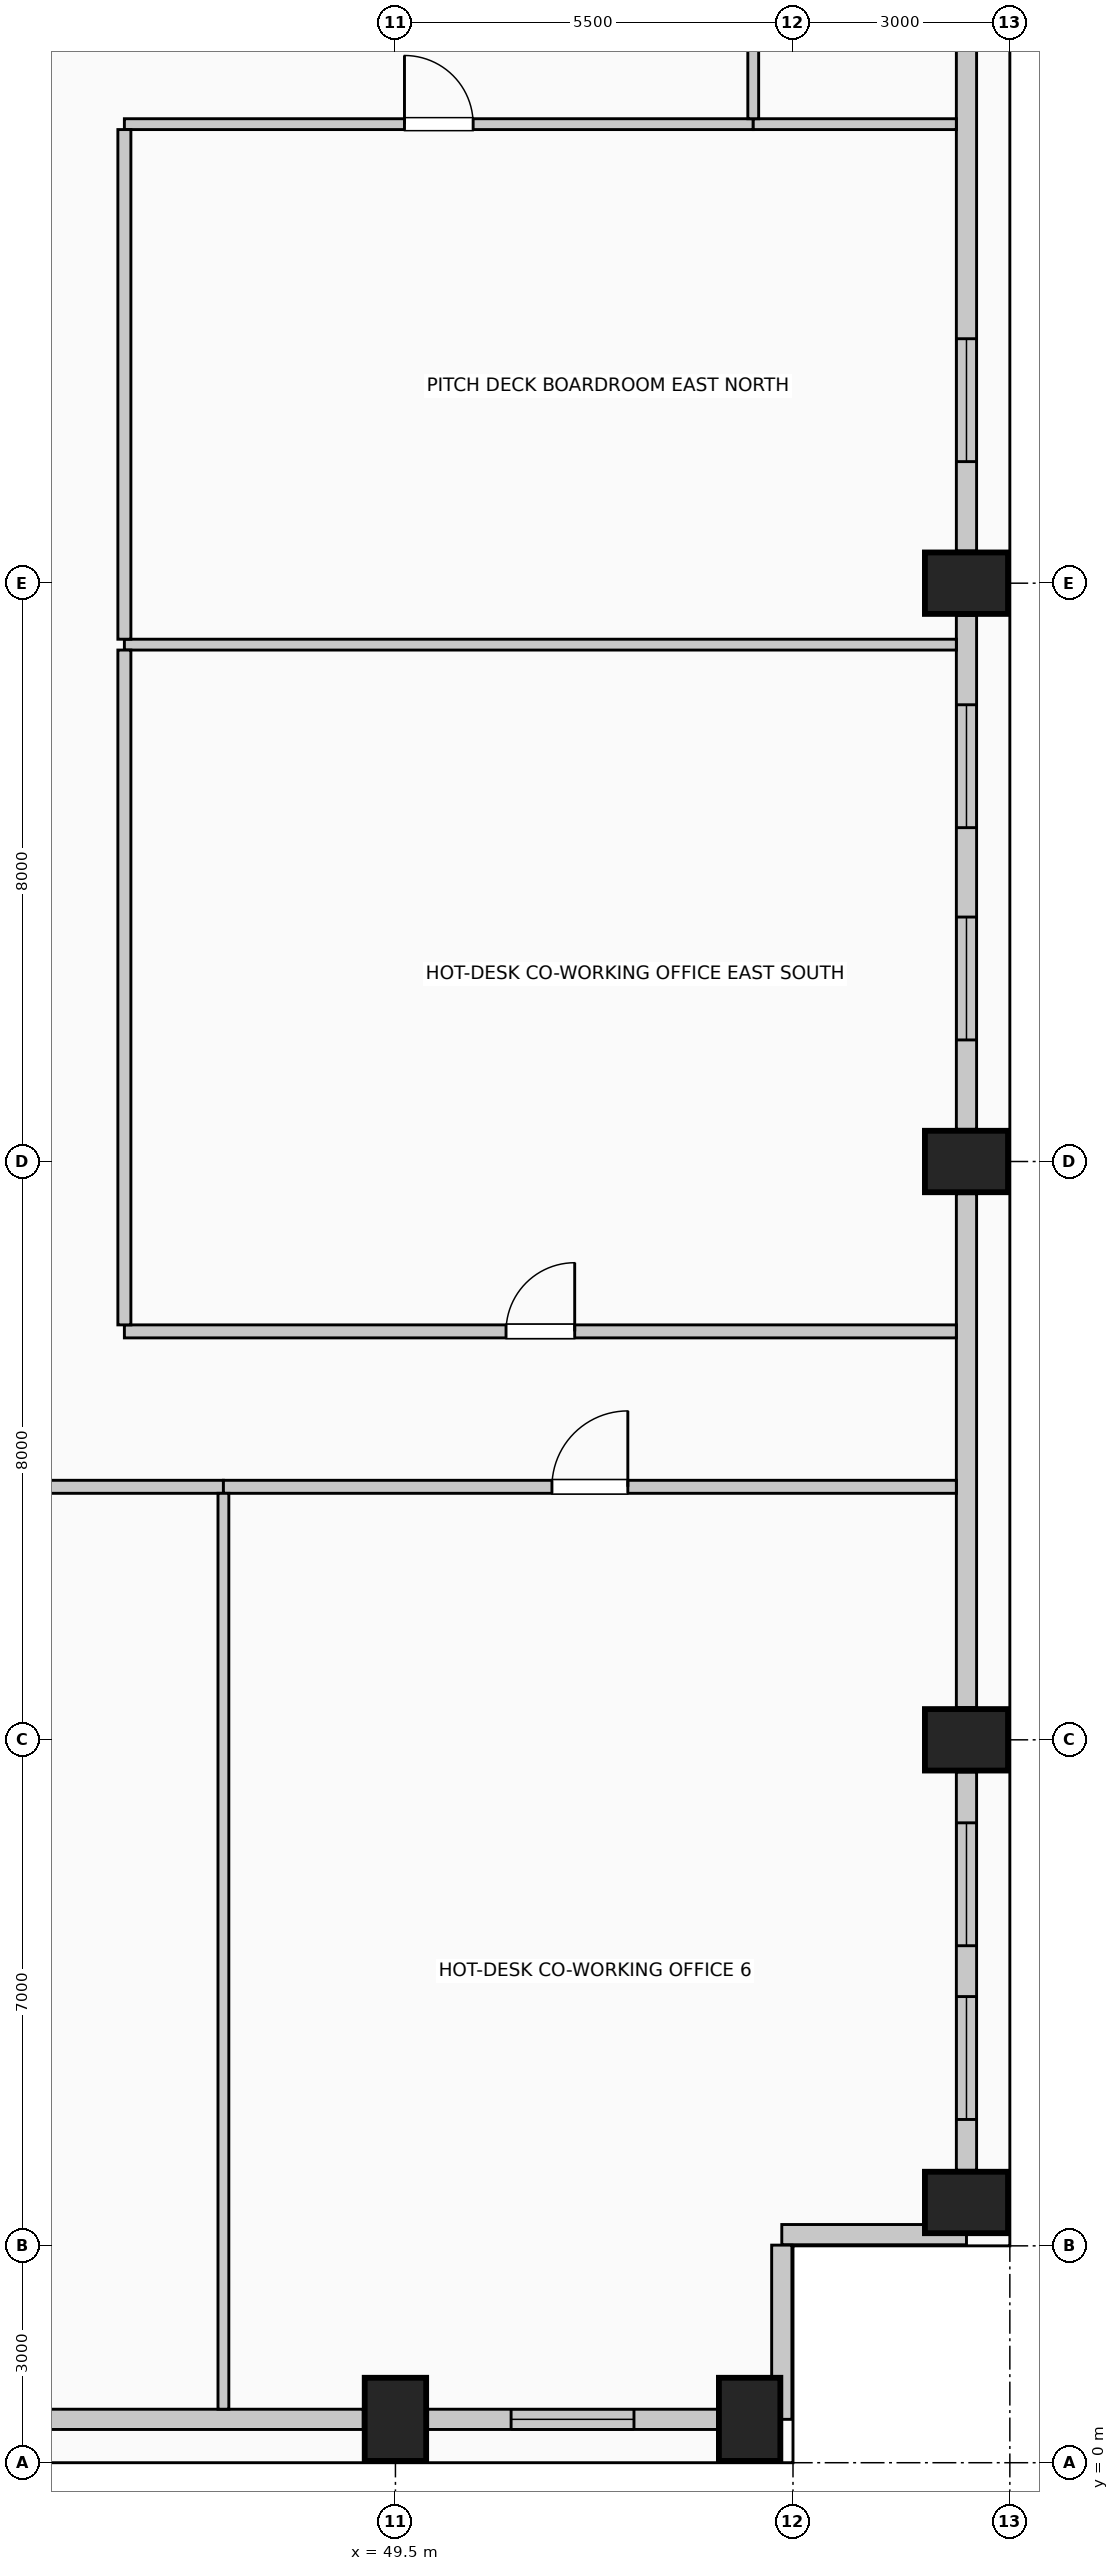
"""IFC4 building model, lengths in metres.
Left out: names, types, materials, properties, quantities, classifications, styles, units other than length and angle.
Written with IfcOpenShell. Run it as: python <this file> out.ifc"""

import sys

from ifc_helpers import new_model, si_unit, direction, frame, frame_2d, origin, origin_2d, place, context, subcontext, project, spatial, rectangle, extrude, element, fill, save


model = new_model("IFC4")
c1 = context("Model", 3, precision=1e-05, world=origin(), true_north=direction((0.0, 1.0)))
c2 = subcontext(c1, "Body", "Model", "MODEL_VIEW")
j1 = project(units=[si_unit("LENGTHUNIT", "METRE"), si_unit("PLANEANGLEUNIT", "RADIAN")], contexts=[c1])
p1 = place(None, origin())
s1 = spatial("IfcSite", under=j1, at=p1, CompositionType="ELEMENT")
p2 = place(p1, origin())
s2 = spatial("IfcBuilding", under=s1, at=p2, CompositionType="ELEMENT")
p3 = place(p2, frame((0.0, 0.0, 96.6)))
s3 = spatial("IfcBuildingStorey", under=s2, at=p3, CompositionType="ELEMENT", Elevation=96.6)
for number, where, z_axis, x_axis in (
    (1, (49.5, 0.6, 0.0), (0.0, 0.0, 1.0), (1.0, 0.0, 0.0)),
    (2, (54.4, 0.6, 0.0), (0.0, 0.0, 1.0), (1.0, 0.0, 0.0)),
    (3, (57.4, 3.6, 0.0), (0.0, 0.0, 1.0), (0.0, 1.0, 0.0)),
    (4, (57.4, 10.0, 0.0), (0.0, 0.0, 1.0), (0.0, 1.0, 0.0)),
    (5, (57.4, 18.0, 0.0), (0.0, 0.0, 1.0), (0.0, 1.0, 0.0)),
    (6, (57.4, 26.0, 0.0), (0.0, 0.0, 1.0), (0.0, 1.0, 0.0)),
):
    element("IfcColumn", number, at=place(p3, frame(where, z_axis=z_axis, x_axis=x_axis)), inside=s3, PredefinedType="COLUMN", context=c2, shape_type="SweptSolid", body=[
        extrude(rectangle(XDim=0.85, YDim=1.15, at=origin_2d()), origin(), (0.0, 0.0, 1.0), 4.0),
    ])
p4 = place(p3, frame((49.055, 0.6, 0.0), z_axis=(0.0, 0.0, 1.0), x_axis=(-1.0, 0.0, 0.0)))
e7 = element("IfcWall", 7, at=p4, inside=s3, PredefinedType="SOLIDWALL", context=c2, shape_type="SweptSolid", body=[
    extrude(rectangle(XDim=4.61, YDim=0.28, at=frame_2d((2.305, 0.0))), origin(), (0.0, 0.0, 1.0), 2.875),
])
p5 = place(p3, frame((53.955, 0.6, 0.0), z_axis=(0.0, 0.0, 1.0), x_axis=(-1.0, 0.0, 0.0)))
e8 = element("IfcWall", 8, at=p5, inside=s3, PredefinedType="SOLIDWALL", context=c2, shape_type="SweptSolid", body=[
    extrude(rectangle(XDim=4.01, YDim=0.28, at=frame_2d((2.005, 0.0))), origin(), (0.0, 0.0, 1.0), 2.875),
])
p6 = place(p5, frame((1.155, 0.0, 0.5)))
e9 = element("IfcOpeningElement", 9, at=p6, cuts=e8, PredefinedType="OPENING", context=c2, shape_type="SweptSolid", body=[
    extrude(rectangle(XDim=1.7, YDim=1.95, at=frame_2d((0.85, 0.975))), frame((0.0, 0.15, 0.0), z_axis=(0.0, -1.0, 0.0), x_axis=(1.0, 0.0, 0.0)), (0.0, 0.0, 1.0), 0.3),
])
p7 = place(p3, frame((57.4, 9.555, 0.0), z_axis=(0.0, 0.0, 1.0), x_axis=(0.0, -1.0, 0.0)))
e10 = element("IfcWall", 10, at=p7, inside=s3, PredefinedType="SOLIDWALL", context=c2, shape_type="SweptSolid", body=[
    extrude(rectangle(XDim=5.51, YDim=0.28, at=frame_2d((2.755, 0.0))), origin(), (0.0, 0.0, 1.0), 2.875),
])
p8 = place(p7, frame((0.703, 0.0, 0.5)))
e11 = element("IfcOpeningElement", 11, at=p8, cuts=e10, PredefinedType="OPENING", context=c2, shape_type="SweptSolid", body=[
    extrude(rectangle(XDim=1.7, YDim=1.95, at=frame_2d((0.85, 0.975))), frame((0.0, 0.15, 0.0), z_axis=(0.0, -1.0, 0.0), x_axis=(1.0, 0.0, 0.0)), (0.0, 0.0, 1.0), 0.3),
])
p9 = place(p7, frame((3.107, 0.0, 0.5)))
e12 = element("IfcOpeningElement", 12, at=p9, cuts=e10, PredefinedType="OPENING", context=c2, shape_type="SweptSolid", body=[
    extrude(rectangle(XDim=1.7, YDim=1.95, at=frame_2d((0.85, 0.975))), frame((0.0, 0.15, 0.0), z_axis=(0.0, -1.0, 0.0), x_axis=(1.0, 0.0, 0.0)), (0.0, 0.0, 1.0), 0.3),
])
p10 = place(p3, frame((57.4, 17.555, 0.0), z_axis=(0.0, 0.0, 1.0), x_axis=(0.0, -1.0, 0.0)))
e13 = element("IfcWall", 13, at=p10, inside=s3, PredefinedType="SOLIDWALL", context=c2, shape_type="SweptSolid", body=[
    extrude(rectangle(XDim=7.11, YDim=0.28, at=frame_2d((3.555, 0.0))), origin(), (0.0, 0.0, 1.0), 2.875),
])
p11 = place(p3, frame((57.4, 25.555, 0.0), z_axis=(0.0, 0.0, 1.0), x_axis=(0.0, -1.0, 0.0)))
e14 = element("IfcWall", 14, at=p11, inside=s3, PredefinedType="SOLIDWALL", context=c2, shape_type="SweptSolid", body=[
    extrude(rectangle(XDim=7.11, YDim=0.28, at=frame_2d((3.555, 0.0))), origin(), (0.0, 0.0, 1.0), 2.875),
])
p12 = place(p11, frame((1.237, 0.0, 0.5)))
e15 = element("IfcOpeningElement", 15, at=p12, cuts=e14, PredefinedType="OPENING", context=c2, shape_type="SweptSolid", body=[
    extrude(rectangle(XDim=1.7, YDim=1.95, at=frame_2d((0.85, 0.975))), frame((0.0, 0.15, 0.0), z_axis=(0.0, -1.0, 0.0), x_axis=(1.0, 0.0, 0.0)), (0.0, 0.0, 1.0), 0.3),
])
p13 = place(p11, frame((4.173, 0.0, 0.5)))
e16 = element("IfcOpeningElement", 16, at=p13, cuts=e14, PredefinedType="OPENING", context=c2, shape_type="SweptSolid", body=[
    extrude(rectangle(XDim=1.7, YDim=1.95, at=frame_2d((0.85, 0.975))), frame((0.0, 0.15, 0.0), z_axis=(0.0, -1.0, 0.0), x_axis=(1.0, 0.0, 0.0)), (0.0, 0.0, 1.0), 0.3),
])
p14 = place(p3, frame((57.4, 33.555, 0.0), z_axis=(0.0, 0.0, 1.0), x_axis=(0.0, -1.0, 0.0)))
e17 = element("IfcWall", 17, at=p14, inside=s3, PredefinedType="SOLIDWALL", context=c2, shape_type="SweptSolid", body=[
    extrude(rectangle(XDim=7.11, YDim=0.28, at=frame_2d((3.555, 0.0))), origin(), (0.0, 0.0, 1.0), 2.875),
])
p15 = place(p14, frame((4.173, 0.0, 0.5)))
e18 = element("IfcOpeningElement", 18, at=p15, cuts=e17, PredefinedType="OPENING", context=c2, shape_type="SweptSolid", body=[
    extrude(rectangle(XDim=1.7, YDim=1.95, at=frame_2d((0.85, 0.975))), frame((0.0, 0.15, 0.0), z_axis=(0.0, -1.0, 0.0), x_axis=(1.0, 0.0, 0.0)), (0.0, 0.0, 1.0), 0.3),
])
p16 = place(p3, frame((57.4, 3.155, 0.0), z_axis=(0.0, 0.0, 1.0), x_axis=(-1.0, 0.0, 0.0)))
e19 = element("IfcWall", 19, at=p16, inside=s3, PredefinedType="SOLIDWALL", context=c2, shape_type="SweptSolid", body=[
    extrude(rectangle(XDim=2.555, YDim=0.28, at=frame_2d((1.277, 0.0))), origin(), (0.0, 0.0, 1.0), 3.725),
])
p17 = place(p3, frame((54.845, 3.01, 0.0), z_axis=(0.0, 0.0, 1.0), x_axis=(0.0, -1.0, 0.0)))
e20 = element("IfcWall", 20, at=p17, inside=s3, PredefinedType="SOLIDWALL", context=c2, shape_type="SweptSolid", body=[
    extrude(rectangle(XDim=2.41, YDim=0.28, at=frame_2d((1.205, 0.0))), origin(), (0.0, 0.0, 1.0), 3.725),
])
p18 = place(p3, frame((37.52, 13.5, 0.0), z_axis=(0.0, 0.0, 1.0), x_axis=(1.0, 0.0, 0.0)))
e21 = element("IfcWall", 21, at=p18, inside=s3, PredefinedType="PARTITIONING", context=c2, shape_type="SweptSolid", body=[
    extrude(rectangle(XDim=9.6, YDim=0.18, at=frame_2d((4.8, 0.0))), origin(), (0.0, 0.0, 1.0), 3.725),
])
p19 = place(p18, frame((4.325, 0.0, 0.0)))
e22 = element("IfcOpeningElement", 22, at=p19, cuts=e21, PredefinedType="OPENING", context=c2, shape_type="SweptSolid", body=[
    extrude(rectangle(XDim=0.95, YDim=2.15, at=frame_2d((0.475, 1.075))), frame((0.0, 0.1, 0.0), z_axis=(0.0, -1.0, 0.0), x_axis=(1.0, 0.0, 0.0)), (0.0, 0.0, 1.0), 0.2),
])
p20 = place(p3, frame((47.12, 13.5, 0.0), z_axis=(0.0, 0.0, 1.0), x_axis=(1.0, 0.0, 0.0)))
e23 = element("IfcWall", 23, at=p20, inside=s3, PredefinedType="PARTITIONING", context=c2, shape_type="SweptSolid", body=[
    extrude(rectangle(XDim=10.14, YDim=0.18, at=frame_2d((5.07, 0.0))), origin(), (0.0, 0.0, 1.0), 3.725),
])
p21 = place(p20, frame((4.545, 0.0, 0.0)))
e24 = element("IfcOpeningElement", 24, at=p21, cuts=e23, PredefinedType="OPENING", context=c2, shape_type="SweptSolid", body=[
    extrude(rectangle(XDim=1.05, YDim=2.15, at=frame_2d((0.525, 1.075))), frame((0.0, 0.1, 0.0), z_axis=(0.0, -1.0, 0.0), x_axis=(1.0, 0.0, 0.0)), (0.0, 0.0, 1.0), 0.2),
])
p22 = place(p3, frame((45.75, 15.65, 0.0), z_axis=(0.0, 0.0, 1.0), x_axis=(1.0, 0.0, 0.0)))
e25 = element("IfcWall", 25, at=p22, inside=s3, PredefinedType="PARTITIONING", context=c2, shape_type="SweptSolid", body=[
    extrude(rectangle(XDim=11.51, YDim=0.18, at=frame_2d((5.755, 0.0))), origin(), (0.0, 0.0, 1.0), 3.725),
])
p23 = place(p22, frame((5.28, 0.0, 0.0)))
e26 = element("IfcOpeningElement", 26, at=p23, cuts=e25, PredefinedType="OPENING", context=c2, shape_type="SweptSolid", body=[
    extrude(rectangle(XDim=0.95, YDim=2.15, at=frame_2d((0.475, 1.075))), frame((0.0, 0.1, 0.0), z_axis=(0.0, -1.0, 0.0), x_axis=(1.0, 0.0, 0.0)), (0.0, 0.0, 1.0), 0.2),
])
p24 = place(p3, frame((45.75, 25.15, 0.0), z_axis=(0.0, 0.0, 1.0), x_axis=(1.0, 0.0, 0.0)))
e27 = element("IfcWall", 27, at=p24, inside=s3, PredefinedType="PARTITIONING", context=c2, shape_type="SweptSolid", body=[
    extrude(rectangle(XDim=11.51, YDim=0.15, at=frame_2d((5.755, 0.0))), origin(), (0.0, 0.0, 1.0), 3.17),
])
p25 = place(p3, frame((45.75, 32.35, 0.0), z_axis=(0.0, 0.0, 1.0), x_axis=(1.0, 0.0, 0.0)))
e28 = element("IfcWall", 28, at=p25, inside=s3, PredefinedType="PARTITIONING", context=c2, shape_type="SweptSolid", body=[
    extrude(rectangle(XDim=8.7, YDim=0.15, at=frame_2d((4.35, 0.0))), origin(), (0.0, 0.0, 1.0), 3.725),
])
p26 = place(p25, frame((3.875, 0.0, 0.0)))
e29 = element("IfcOpeningElement", 29, at=p26, cuts=e28, PredefinedType="OPENING", context=c2, shape_type="SweptSolid", body=[
    extrude(rectangle(XDim=0.95, YDim=2.15, at=frame_2d((0.475, 1.075))), frame((0.0, 0.085, 0.0), z_axis=(0.0, -1.0, 0.0), x_axis=(1.0, 0.0, 0.0)), (0.0, 0.0, 1.0), 0.17),
])
p27 = place(p3, frame((54.45, 32.35, 0.0), z_axis=(0.0, 0.0, 1.0), x_axis=(1.0, 0.0, 0.0)))
e30 = element("IfcWall", 30, at=p27, inside=s3, PredefinedType="PARTITIONING", context=c2, shape_type="SweptSolid", body=[
    extrude(rectangle(XDim=2.81, YDim=0.15, at=frame_2d((1.405, 0.0))), origin(), (0.0, 0.0, 1.0), 3.725),
])
p28 = place(p3, frame((45.75, 15.74, 0.0), z_axis=(0.0, 0.0, 1.0), x_axis=(0.0, 1.0, 0.0)))
e31 = element("IfcWall", 31, at=p28, inside=s3, PredefinedType="PARTITIONING", context=c2, shape_type="SweptSolid", body=[
    extrude(rectangle(XDim=9.335, YDim=0.18, at=frame_2d((4.667, 0.0))), origin(), (0.0, 0.0, 1.0), 3.725),
])
p29 = place(p3, frame((45.75, 25.225, 0.0), z_axis=(0.0, 0.0, 1.0), x_axis=(0.0, 1.0, 0.0)))
e32 = element("IfcWall", 32, at=p29, inside=s3, PredefinedType="PARTITIONING", context=c2, shape_type="SweptSolid", body=[
    extrude(rectangle(XDim=7.05, YDim=0.18, at=frame_2d((3.525, 0.0))), origin(), (0.0, 0.0, 1.0), 3.725),
])
p30 = place(p3, frame((47.12, 0.74, 0.0), z_axis=(0.0, 0.0, 1.0), x_axis=(0.0, 1.0, 0.0)))
e33 = element("IfcWall", 33, at=p30, inside=s3, PredefinedType="PARTITIONING", context=c2, shape_type="SweptSolid", body=[
    extrude(rectangle(XDim=12.67, YDim=0.15, at=frame_2d((6.335, 0.0))), origin(), (0.0, 0.0, 1.0), 3.725),
])
p31 = place(p3, frame((54.45, 32.425, 0.0), z_axis=(0.0, 0.0, 1.0), x_axis=(0.0, 1.0, 0.0)))
e34 = element("IfcWall", 34, at=p31, inside=s3, PredefinedType="PARTITIONING", context=c2, shape_type="SweptSolid", body=[
    extrude(rectangle(XDim=1.725, YDim=0.15, at=frame_2d((0.862, 0.0))), origin(), (0.0, 0.0, 1.0), 3.725),
])
p32 = place(p6, origin())
e35 = element("IfcWindow", 35, at=p32, inside=s3, PartitioningType="SINGLE_PANEL", PredefinedType="WINDOW", context=c2, shape_type="SweptSolid", body=[
    extrude(rectangle(XDim=1.7, YDim=1.95, at=frame_2d((0.85, 0.975))), frame((0.0, 0.03, 0.0), z_axis=(0.0, -1.0, 0.0), x_axis=(1.0, 0.0, 0.0)), (0.0, 0.0, 1.0), 0.06),
])
fill(e9, e35)
p33 = place(p8, origin())
e36 = element("IfcWindow", 36, at=p33, inside=s3, PartitioningType="SINGLE_PANEL", PredefinedType="WINDOW", context=c2, shape_type="SweptSolid", body=[
    extrude(rectangle(XDim=1.7, YDim=1.95, at=frame_2d((0.85, 0.975))), frame((0.0, 0.03, 0.0), z_axis=(0.0, -1.0, 0.0), x_axis=(1.0, 0.0, 0.0)), (0.0, 0.0, 1.0), 0.06),
])
fill(e11, e36)
p34 = place(p9, origin())
e37 = element("IfcWindow", 37, at=p34, inside=s3, PartitioningType="SINGLE_PANEL", PredefinedType="WINDOW", context=c2, shape_type="SweptSolid", body=[
    extrude(rectangle(XDim=1.7, YDim=1.95, at=frame_2d((0.85, 0.975))), frame((0.0, 0.03, 0.0), z_axis=(0.0, -1.0, 0.0), x_axis=(1.0, 0.0, 0.0)), (0.0, 0.0, 1.0), 0.06),
])
fill(e12, e37)
p35 = place(p12, origin())
e38 = element("IfcWindow", 38, at=p35, inside=s3, PartitioningType="SINGLE_PANEL", PredefinedType="WINDOW", context=c2, shape_type="SweptSolid", body=[
    extrude(rectangle(XDim=1.7, YDim=1.95, at=frame_2d((0.85, 0.975))), frame((0.0, 0.03, 0.0), z_axis=(0.0, -1.0, 0.0), x_axis=(1.0, 0.0, 0.0)), (0.0, 0.0, 1.0), 0.06),
])
fill(e15, e38)
p36 = place(p13, origin())
e39 = element("IfcWindow", 39, at=p36, inside=s3, PartitioningType="SINGLE_PANEL", PredefinedType="WINDOW", context=c2, shape_type="SweptSolid", body=[
    extrude(rectangle(XDim=1.7, YDim=1.95, at=frame_2d((0.85, 0.975))), frame((0.0, 0.03, 0.0), z_axis=(0.0, -1.0, 0.0), x_axis=(1.0, 0.0, 0.0)), (0.0, 0.0, 1.0), 0.06),
])
fill(e16, e39)
p37 = place(p15, origin())
e40 = element("IfcWindow", 40, at=p37, inside=s3, PartitioningType="SINGLE_PANEL", PredefinedType="WINDOW", context=c2, shape_type="SweptSolid", body=[
    extrude(rectangle(XDim=1.7, YDim=1.95, at=frame_2d((0.85, 0.975))), frame((0.0, 0.03, 0.0), z_axis=(0.0, -1.0, 0.0), x_axis=(1.0, 0.0, 0.0)), (0.0, 0.0, 1.0), 0.06),
])
fill(e18, e40)
p38 = place(p21, origin())
e41 = element("IfcDoor", 41, at=p38, inside=s3, OperationType="SINGLE_SWING_RIGHT", PredefinedType="DOOR", context=c2, shape_type="SweptSolid", body=[
    extrude(rectangle(XDim=1.05, YDim=2.15, at=frame_2d((0.525, 1.075))), frame((0.0, 0.025, 0.0), z_axis=(0.0, -1.0, 0.0), x_axis=(1.0, 0.0, 0.0)), (0.0, 0.0, 1.0), 0.05),
])
fill(e24, e41)
p39 = place(p23, origin())
e42 = element("IfcDoor", 42, at=p39, inside=s3, OperationType="SINGLE_SWING_RIGHT", PredefinedType="DOOR", context=c2, shape_type="SweptSolid", body=[
    extrude(rectangle(XDim=0.95, YDim=2.15, at=frame_2d((0.475, 1.075))), frame((0.0, 0.025, 0.0), z_axis=(0.0, -1.0, 0.0), x_axis=(1.0, 0.0, 0.0)), (0.0, 0.0, 1.0), 0.05),
])
fill(e26, e42)
p40 = place(p26, origin())
e43 = element("IfcDoor", 43, at=p40, inside=s3, OperationType="SINGLE_SWING_LEFT", PredefinedType="DOOR", context=c2, shape_type="SweptSolid", body=[
    extrude(rectangle(XDim=0.95, YDim=2.15, at=frame_2d((0.475, 1.075))), frame((0.0, 0.025, 0.0), z_axis=(0.0, -1.0, 0.0), x_axis=(1.0, 0.0, 0.0)), (0.0, 0.0, 1.0), 0.05),
])
fill(e29, e43)
save(model, sys.argv[1])
